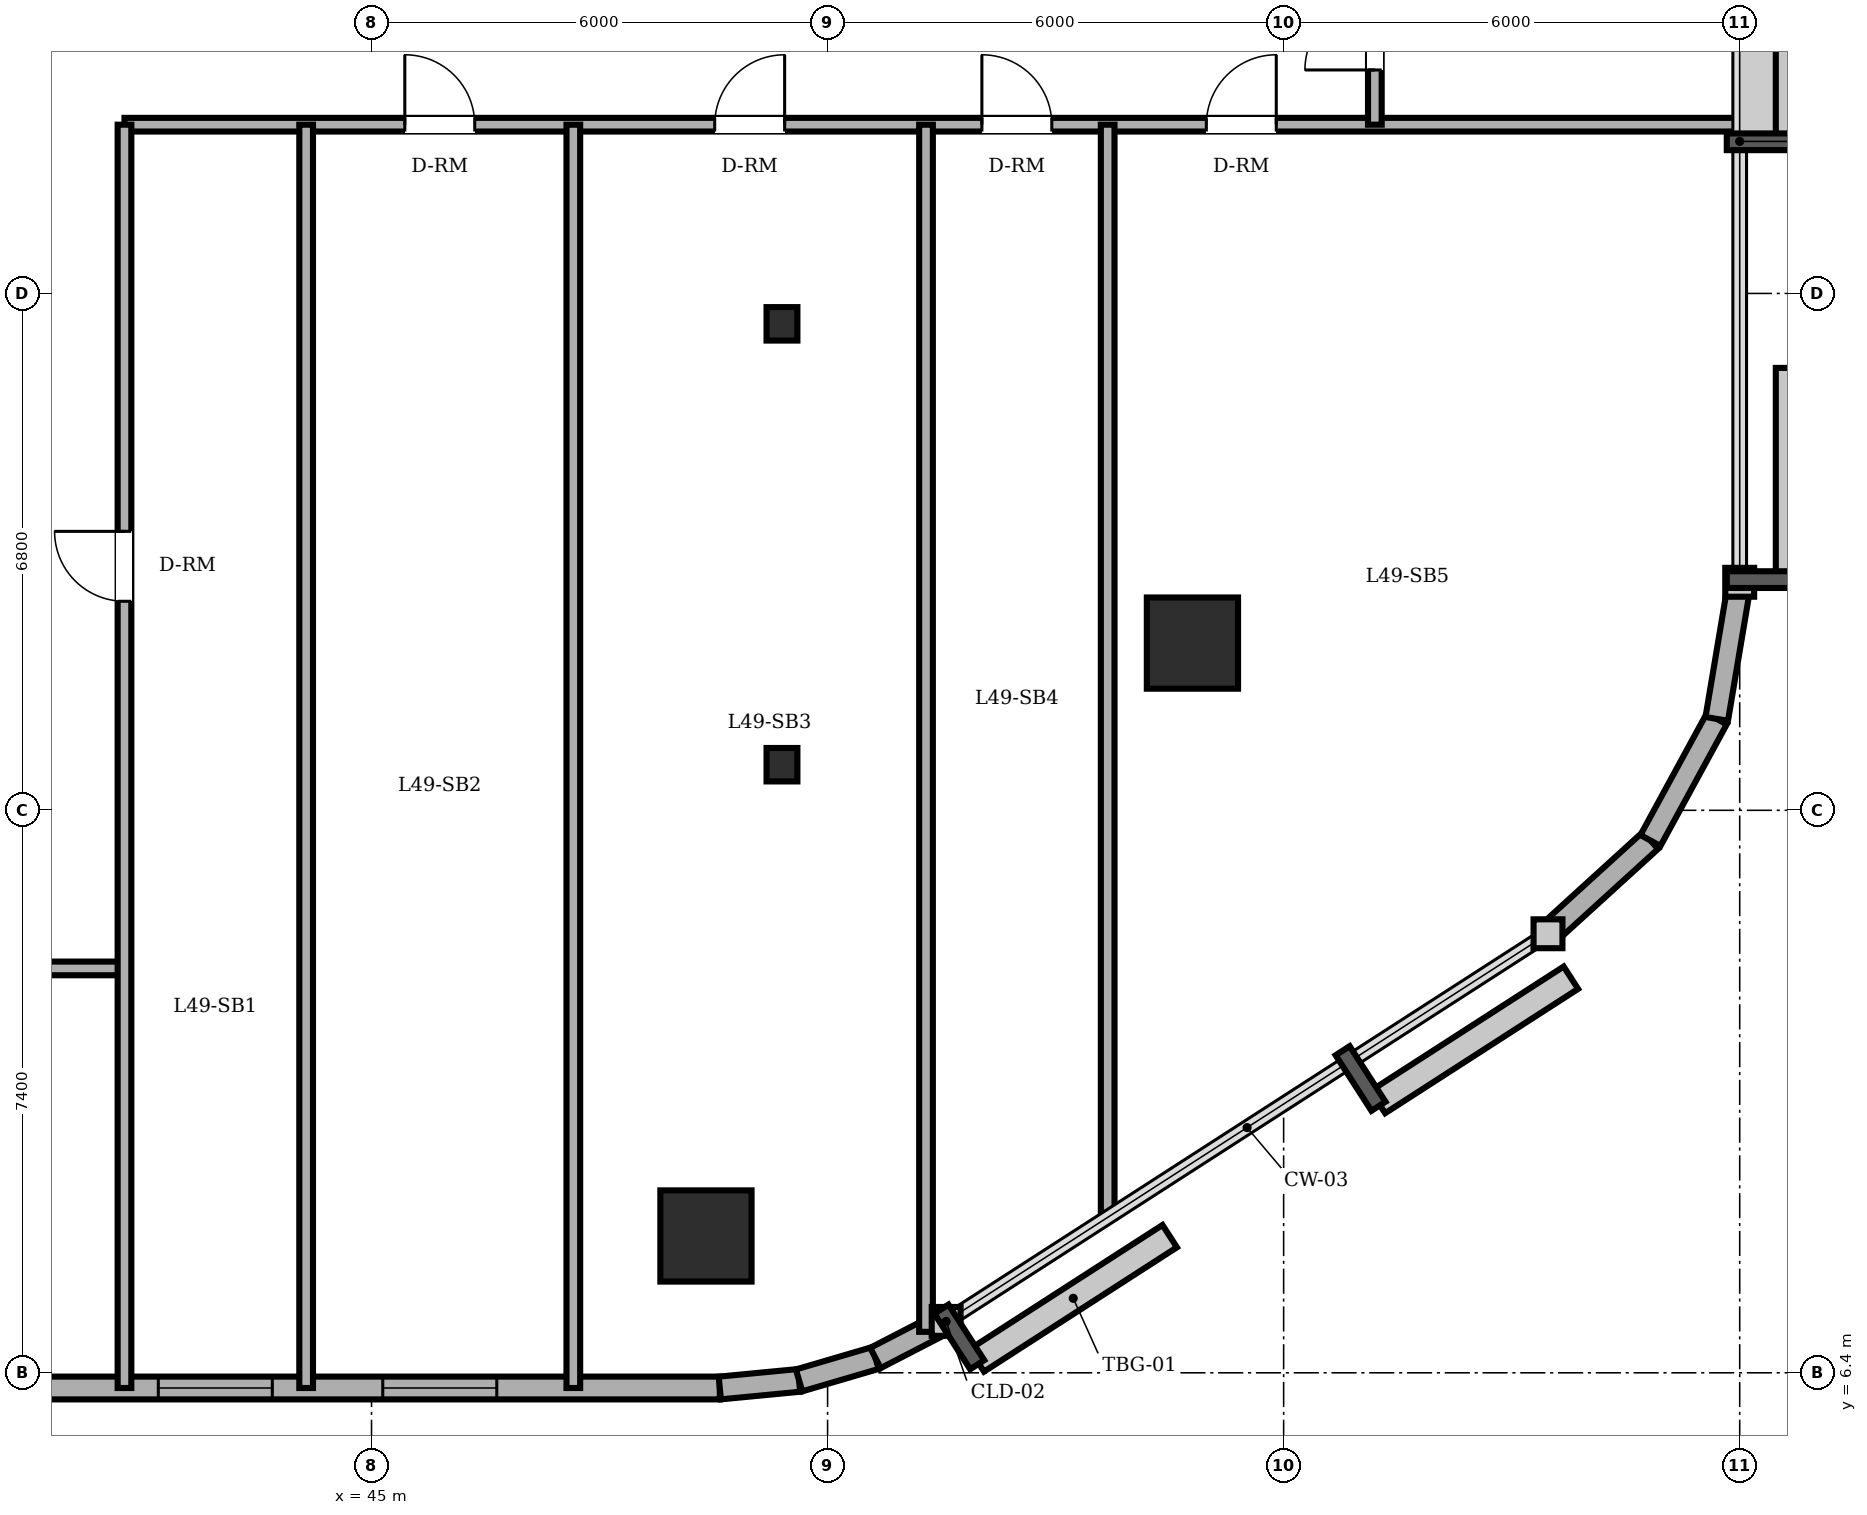
"""IFC4 building model, lengths in metres.
Left out: names, types, materials, properties, quantities, classifications, styles, units other than length and angle.
Written with IfcOpenShell. Run it as: python <this file> out.ifc"""

import sys

from ifc_helpers import new_model, si_unit, direction, frame, frame_2d, origin, origin_2d, place, context, subcontext, project, spatial, rectangle, circle, i_section, extrude, element, fill, save


model = new_model("IFC4")
c1 = context("Model", 3, precision=1e-05, world=origin(), true_north=direction((0.0, 1.0)))
c2 = subcontext(c1, "Body", "Model", "MODEL_VIEW")
j1 = project(units=[si_unit("LENGTHUNIT", "METRE"), si_unit("PLANEANGLEUNIT", "RADIAN")], contexts=[c1])
p1 = place(None, origin())
s1 = spatial("IfcSite", under=j1, at=p1, CompositionType="ELEMENT")
p2 = place(p1, origin())
s2 = spatial("IfcBuilding", under=s1, at=p2, CompositionType="ELEMENT")
p3 = place(p2, frame((0.0, 0.0, 187.0)))
s3 = spatial("IfcBuildingStorey", under=s2, at=p3, CompositionType="ELEMENT", Elevation=187.0)
for number, where, z_axis, x_axis in (
    (1, (49.4, 8.2, 0.0), (0.0, 0.0, 1.0), (1.0, 0.0, 0.0)),
    (2, (55.8, 16.0, 0.0), (0.0, 0.0, 1.0), (1.0, 0.0, 0.0)),
):
    element("IfcColumn", number, at=place(p3, frame(where, z_axis=z_axis, x_axis=x_axis)), inside=s3, PredefinedType="COLUMN", context=c2, shape_type="SweptSolid", body=[
        extrude(circle(Radius=0.6, at=origin_2d()), origin(), (0.0, 0.0, 1.0), 3.6),
    ])
for number, where, z_axis, x_axis in (
    (3, (50.4, 14.4, 0.0), (0.0, 0.0, 1.0), (1.0, 0.0, 0.0)),
    (4, (50.4, 20.2, 0.0), (0.0, 0.0, 1.0), (1.0, 0.0, 0.0)),
):
    element("IfcColumn", number, at=place(p3, frame(where, z_axis=z_axis, x_axis=x_axis)), inside=s3, PredefinedType="COLUMN", context=c2, shape_type="SweptSolid", body=[
        extrude(i_section(OverallWidth=0.406, OverallDepth=0.44, WebThickness=0.024, FlangeThickness=0.039, FilletRadius=0.015, at=origin_2d()), origin(), (0.0, 0.0, 1.0), 3.6),
    ])
p4 = place(p3, frame((19.3, 6.2, 0.0), z_axis=(0.0, 0.0, 1.0), x_axis=(1.0, 0.0, 0.0)))
e5 = element("IfcWall", 5, at=p4, inside=s3, PredefinedType="SOLIDWALL", context=c2, shape_type="SweptSolid", body=[
    extrude(rectangle(XDim=30.282, YDim=0.3, at=frame_2d((15.141, 0.0))), origin(), (0.0, 0.0, 1.0), 3.36),
])
p5 = place(p4, frame((14.225, 0.0, 0.0)))
e6 = element("IfcOpeningElement", 6, at=p5, cuts=e5, PredefinedType="OPENING", context=c2, shape_type="SweptSolid", body=[
    extrude(rectangle(XDim=0.95, YDim=2.2, at=frame_2d((0.475, 1.1))), frame((0.0, 0.16, 0.0), z_axis=(0.0, -1.0, 0.0), x_axis=(1.0, 0.0, 0.0)), (0.0, 0.0, 1.0), 0.32),
])
p6 = place(p4, frame((1.25, 0.0, 0.85)))
e7 = element("IfcOpeningElement", 7, at=p6, cuts=e5, PredefinedType="OPENING", context=c2, shape_type="SweptSolid", body=[
    extrude(rectangle(XDim=1.5, YDim=1.55, at=frame_2d((0.75, 0.775))), frame((0.0, 0.16, 0.0), z_axis=(0.0, -1.0, 0.0), x_axis=(1.0, 0.0, 0.0)), (0.0, 0.0, 1.0), 0.32),
])
p7 = place(p4, frame((2.9, 0.0, 0.85)))
e8 = element("IfcOpeningElement", 8, at=p7, cuts=e5, PredefinedType="OPENING", context=c2, shape_type="SweptSolid", body=[
    extrude(rectangle(XDim=1.5, YDim=1.55, at=frame_2d((0.75, 0.775))), frame((0.0, 0.16, 0.0), z_axis=(0.0, -1.0, 0.0), x_axis=(1.0, 0.0, 0.0)), (0.0, 0.0, 1.0), 0.32),
])
p8 = place(p4, frame((6.45, 0.0, 0.85)))
e9 = element("IfcOpeningElement", 9, at=p8, cuts=e5, PredefinedType="OPENING", context=c2, shape_type="SweptSolid", body=[
    extrude(rectangle(XDim=1.5, YDim=1.55, at=frame_2d((0.75, 0.775))), frame((0.0, 0.16, 0.0), z_axis=(0.0, -1.0, 0.0), x_axis=(1.0, 0.0, 0.0)), (0.0, 0.0, 1.0), 0.32),
])
p9 = place(p4, frame((17.25, 0.0, 0.85)))
e10 = element("IfcOpeningElement", 10, at=p9, cuts=e5, PredefinedType="OPENING", context=c2, shape_type="SweptSolid", body=[
    extrude(rectangle(XDim=1.5, YDim=1.55, at=frame_2d((0.75, 0.775))), frame((0.0, 0.16, 0.0), z_axis=(0.0, -1.0, 0.0), x_axis=(1.0, 0.0, 0.0)), (0.0, 0.0, 1.0), 0.32),
])
p10 = place(p4, frame((22.895, 0.0, 0.85)))
e11 = element("IfcOpeningElement", 11, at=p10, cuts=e5, PredefinedType="OPENING", context=c2, shape_type="SweptSolid", body=[
    extrude(rectangle(XDim=1.5, YDim=1.55, at=frame_2d((0.75, 0.775))), frame((0.0, 0.16, 0.0), z_axis=(0.0, -1.0, 0.0), x_axis=(1.0, 0.0, 0.0)), (0.0, 0.0, 1.0), 0.32),
])
p11 = place(p4, frame((25.848, 0.0, 0.85)))
e12 = element("IfcOpeningElement", 12, at=p11, cuts=e5, PredefinedType="OPENING", context=c2, shape_type="SweptSolid", body=[
    extrude(rectangle(XDim=1.5, YDim=1.55, at=frame_2d((0.75, 0.775))), frame((0.0, 0.16, 0.0), z_axis=(0.0, -1.0, 0.0), x_axis=(1.0, 0.0, 0.0)), (0.0, 0.0, 1.0), 0.32),
])
p12 = place(p3, frame((49.582, 6.2, 0.0), z_axis=(0.0, 0.0, 1.0), x_axis=(0.995426089968, 0.095534807324, 0.0)))
e13 = element("IfcWall", 13, at=p12, inside=s3, PredefinedType="SOLIDWALL", context=c2, shape_type="SweptSolid", body=[
    extrude(rectangle(XDim=1.048, YDim=0.3, at=frame_2d((0.524, 0.0))), origin(), (0.0, 0.0, 1.0), 3.36),
])
p13 = place(p3, frame((50.625, 6.3, 0.0), z_axis=(0.0, 0.0, 1.0), x_axis=(0.959528674476, 0.281610942363, 0.0)))
e14 = element("IfcWall", 14, at=p13, inside=s3, PredefinedType="SOLIDWALL", context=c2, shape_type="SweptSolid", body=[
    extrude(rectangle(XDim=1.047, YDim=0.3, at=frame_2d((0.524, 0.0))), origin(), (0.0, 0.0, 1.0), 3.36),
])
p14 = place(p3, frame((51.63, 6.595, 0.0), z_axis=(0.0, 0.0, 1.0), x_axis=(0.888283247196, 0.459296062198, 0.0)))
e15 = element("IfcWall", 15, at=p14, inside=s3, PredefinedType="SOLIDWALL", context=c2, shape_type="SweptSolid", body=[
    extrude(rectangle(XDim=1.047, YDim=0.3, at=frame_2d((0.523, 0.0))), origin(), (0.0, 0.0, 1.0), 3.36),
])
p15 = place(p3, frame((60.478, 12.176, 0.0), z_axis=(0.0, 0.0, 1.0), x_axis=(0.73947929393, 0.673179302897, 0.0)))
e16 = element("IfcWall", 16, at=p15, inside=s3, PredefinedType="SOLIDWALL", context=c2, shape_type="SweptSolid", body=[
    extrude(rectangle(XDim=1.823, YDim=0.3, at=frame_2d((0.911, 0.0))), origin(), (0.0, 0.0, 1.0), 3.36),
])
p16 = place(p3, frame((61.826, 13.403, 0.0), z_axis=(0.0, 0.0, 1.0), x_axis=(0.478608030646, 0.878028674362, 0.0)))
e17 = element("IfcWall", 17, at=p16, inside=s3, PredefinedType="SOLIDWALL", context=c2, shape_type="SweptSolid", body=[
    extrude(rectangle(XDim=1.822, YDim=0.3, at=frame_2d((0.911, 0.0))), origin(), (0.0, 0.0, 1.0), 3.36),
])
p17 = place(p3, frame((62.698, 15.003, 0.0), z_axis=(0.0, 0.0, 1.0), x_axis=(0.165724081207, 0.986172159873, 0.0)))
e18 = element("IfcWall", 18, at=p17, inside=s3, PredefinedType="SOLIDWALL", context=c2, shape_type="SweptSolid", body=[
    extrude(rectangle(XDim=1.822, YDim=0.3, at=frame_2d((0.911, 0.0))), origin(), (0.0, 0.0, 1.0), 3.36),
])
p18 = place(p3, frame((13.8, 11.72, 0.0), z_axis=(0.0, 0.0, 1.0), x_axis=(1.0, 0.0, 0.0)))
e19 = element("IfcWall", 19, at=p18, inside=s3, PredefinedType="PARTITIONING", context=c2, shape_type="SweptSolid", body=[
    extrude(rectangle(XDim=27.95, YDim=0.18, at=frame_2d((13.975, 0.0))), origin(), (0.0, 0.0, 1.0), 3.36),
])
p19 = place(p18, frame((12.24, 0.0, 0.0)))
e20 = element("IfcOpeningElement", 20, at=p19, cuts=e19, PredefinedType="OPENING", context=c2, shape_type="SweptSolid", body=[
    extrude(rectangle(XDim=0.92, YDim=2.1, at=frame_2d((0.46, 1.05))), frame((0.0, 0.1, 0.0), z_axis=(0.0, -1.0, 0.0), x_axis=(1.0, 0.0, 0.0)), (0.0, 0.0, 1.0), 0.2),
])
p20 = place(p18, frame((5.54, 0.0, 0.0)))
e21 = element("IfcOpeningElement", 21, at=p20, cuts=e19, PredefinedType="OPENING", context=c2, shape_type="SweptSolid", body=[
    extrude(rectangle(XDim=0.92, YDim=2.1, at=frame_2d((0.46, 1.05))), frame((0.0, 0.1, 0.0), z_axis=(0.0, -1.0, 0.0), x_axis=(1.0, 0.0, 0.0)), (0.0, 0.0, 1.0), 0.2),
])
p21 = place(p18, frame((20.555, 0.0, 0.0)))
e22 = element("IfcOpeningElement", 22, at=p21, cuts=e19, PredefinedType="OPENING", context=c2, shape_type="SweptSolid", body=[
    extrude(rectangle(XDim=0.92, YDim=2.1, at=frame_2d((0.46, 1.05))), frame((0.0, 0.1, 0.0), z_axis=(0.0, -1.0, 0.0), x_axis=(1.0, 0.0, 0.0)), (0.0, 0.0, 1.0), 0.2),
])
p22 = place(p3, frame((41.75, 22.82, 0.0), z_axis=(0.0, 0.0, 1.0), x_axis=(1.0, 0.0, 0.0)))
e23 = element("IfcWall", 23, at=p22, inside=s3, PredefinedType="PARTITIONING", context=c2, shape_type="SweptSolid", body=[
    extrude(rectangle(XDim=21.25, YDim=0.18, at=frame_2d((10.625, 0.0))), origin(), (0.0, 0.0, 1.0), 3.36),
])
p23 = place(p22, frame((3.688, 0.0, 0.0)))
e24 = element("IfcOpeningElement", 24, at=p23, cuts=e23, PredefinedType="OPENING", context=c2, shape_type="SweptSolid", body=[
    extrude(rectangle(XDim=0.92, YDim=2.1, at=frame_2d((0.46, 1.05))), frame((0.0, 0.1, 0.0), z_axis=(0.0, -1.0, 0.0), x_axis=(1.0, 0.0, 0.0)), (0.0, 0.0, 1.0), 0.2),
])
p24 = place(p22, frame((7.765, 0.0, 0.0)))
e25 = element("IfcOpeningElement", 25, at=p24, cuts=e23, PredefinedType="OPENING", context=c2, shape_type="SweptSolid", body=[
    extrude(rectangle(XDim=0.92, YDim=2.1, at=frame_2d((0.46, 1.05))), frame((0.0, 0.1, 0.0), z_axis=(0.0, -1.0, 0.0), x_axis=(1.0, 0.0, 0.0)), (0.0, 0.0, 1.0), 0.2),
])
p25 = place(p22, frame((11.28, 0.0, 0.0)))
e26 = element("IfcOpeningElement", 26, at=p25, cuts=e23, PredefinedType="OPENING", context=c2, shape_type="SweptSolid", body=[
    extrude(rectangle(XDim=0.92, YDim=2.1, at=frame_2d((0.46, 1.05))), frame((0.0, 0.1, 0.0), z_axis=(0.0, -1.0, 0.0), x_axis=(1.0, 0.0, 0.0)), (0.0, 0.0, 1.0), 0.2),
])
p26 = place(p22, frame((14.233, 0.0, 0.0)))
e27 = element("IfcOpeningElement", 27, at=p26, cuts=e23, PredefinedType="OPENING", context=c2, shape_type="SweptSolid", body=[
    extrude(rectangle(XDim=0.92, YDim=2.1, at=frame_2d((0.46, 1.05))), frame((0.0, 0.1, 0.0), z_axis=(0.0, -1.0, 0.0), x_axis=(1.0, 0.0, 0.0)), (0.0, 0.0, 1.0), 0.2),
])
p27 = place(p3, frame((41.75, 6.2, 0.0), z_axis=(0.0, 0.0, 1.0), x_axis=(0.0, 1.0, 0.0)))
e28 = element("IfcWall", 28, at=p27, inside=s3, PredefinedType="PARTITIONING", context=c2, shape_type="SweptSolid", body=[
    extrude(rectangle(XDim=16.62, YDim=0.18, at=frame_2d((8.31, 0.0))), origin(), (0.0, 0.0, 1.0), 3.36),
])
p28 = place(p27, frame((10.35, 0.0, 0.0)))
e29 = element("IfcOpeningElement", 29, at=p28, cuts=e28, PredefinedType="OPENING", context=c2, shape_type="SweptSolid", body=[
    extrude(rectangle(XDim=0.92, YDim=2.1, at=frame_2d((0.46, 1.05))), frame((0.0, 0.1, 0.0), z_axis=(0.0, -1.0, 0.0), x_axis=(1.0, 0.0, 0.0)), (0.0, 0.0, 1.0), 0.2),
])
for number, where, z_axis, x_axis in (
    (30, (44.14, 6.2, 0.0), (0.0, 0.0, 1.0), (0.0, 1.0, 0.0)),
    (31, (47.655, 6.2, 0.0), (0.0, 0.0, 1.0), (0.0, 1.0, 0.0)),
):
    element("IfcWall", number, at=place(p3, frame(where, z_axis=z_axis, x_axis=x_axis)), inside=s3, PredefinedType="PARTITIONING", context=c2, shape_type="SweptSolid", body=[
        extrude(rectangle(XDim=16.62, YDim=0.18, at=frame_2d((8.31, 0.0))), origin(), (0.0, 0.0, 1.0), 3.36),
    ])
p29 = place(p3, frame((52.295, 6.939, 0.0), z_axis=(0.0, 0.0, 1.0), x_axis=(0.0, 1.0, 0.0)))
e32 = element("IfcWall", 32, at=p29, inside=s3, PredefinedType="PARTITIONING", context=c2, shape_type="SweptSolid", body=[
    extrude(rectangle(XDim=15.881, YDim=0.18, at=frame_2d((7.94, 0.0))), origin(), (0.0, 0.0, 1.0), 3.36),
])
p30 = place(p3, frame((54.685, 8.445, 0.0), z_axis=(0.0, 0.0, 1.0), x_axis=(0.0, 1.0, 0.0)))
e33 = element("IfcWall", 33, at=p30, inside=s3, PredefinedType="PARTITIONING", context=c2, shape_type="SweptSolid", body=[
    extrude(rectangle(XDim=14.375, YDim=0.18, at=frame_2d((7.188, 0.0))), origin(), (0.0, 0.0, 1.0), 3.36),
])
p31 = place(p3, frame((58.2, 22.82, 0.0), z_axis=(0.0, 0.0, 1.0), x_axis=(0.0, 1.0, 0.0)))
e34 = element("IfcWall", 34, at=p31, inside=s3, PredefinedType="PARTITIONING", context=c2, shape_type="SweptSolid", body=[
    extrude(rectangle(XDim=2.36, YDim=0.18, at=frame_2d((1.18, 0.0))), origin(), (0.0, 0.0, 1.0), 3.36),
])
p32 = place(p31, frame((0.72, 0.0, 0.0)))
e35 = element("IfcOpeningElement", 35, at=p32, cuts=e34, PredefinedType="OPENING", context=c2, shape_type="SweptSolid", body=[
    extrude(rectangle(XDim=0.92, YDim=2.1, at=frame_2d((0.46, 1.05))), frame((0.0, 0.1, 0.0), z_axis=(0.0, -1.0, 0.0), x_axis=(1.0, 0.0, 0.0)), (0.0, 0.0, 1.0), 0.2),
])
p33 = place(p10, origin())
e36 = element("IfcWindow", 36, at=p33, inside=s3, PartitioningType="DOUBLE_PANEL_VERTICAL", PredefinedType="WINDOW", context=c2, shape_type="SweptSolid", body=[
    extrude(rectangle(XDim=1.5, YDim=1.55, at=frame_2d((0.75, 0.775))), frame((0.0, 0.03, 0.0), z_axis=(0.0, -1.0, 0.0), x_axis=(1.0, 0.0, 0.0)), (0.0, 0.0, 1.0), 0.06),
])
fill(e11, e36)
p34 = place(p11, origin())
e37 = element("IfcWindow", 37, at=p34, inside=s3, PartitioningType="DOUBLE_PANEL_VERTICAL", PredefinedType="WINDOW", context=c2, shape_type="SweptSolid", body=[
    extrude(rectangle(XDim=1.5, YDim=1.55, at=frame_2d((0.75, 0.775))), frame((0.0, 0.03, 0.0), z_axis=(0.0, -1.0, 0.0), x_axis=(1.0, 0.0, 0.0)), (0.0, 0.0, 1.0), 0.06),
])
fill(e12, e37)
p35 = place(p28, origin())
e38 = element("IfcDoor", 38, at=p35, inside=s3, OperationType="SINGLE_SWING_RIGHT", PredefinedType="DOOR", context=c2, shape_type="SweptSolid", body=[
    extrude(rectangle(XDim=0.92, YDim=2.1, at=frame_2d((0.46, 1.05))), frame((0.0, 0.025, 0.0), z_axis=(0.0, -1.0, 0.0), x_axis=(1.0, 0.0, 0.0)), (0.0, 0.0, 1.0), 0.05),
])
fill(e29, e38)
p36 = place(p23, origin())
e39 = element("IfcDoor", 39, at=p36, inside=s3, OperationType="SINGLE_SWING_LEFT", PredefinedType="DOOR", context=c2, shape_type="SweptSolid", body=[
    extrude(rectangle(XDim=0.92, YDim=2.1, at=frame_2d((0.46, 1.05))), frame((0.0, 0.025, 0.0), z_axis=(0.0, -1.0, 0.0), x_axis=(1.0, 0.0, 0.0)), (0.0, 0.0, 1.0), 0.05),
])
fill(e24, e39)
p37 = place(p24, origin())
e40 = element("IfcDoor", 40, at=p37, inside=s3, OperationType="SINGLE_SWING_RIGHT", PredefinedType="DOOR", context=c2, shape_type="SweptSolid", body=[
    extrude(rectangle(XDim=0.92, YDim=2.1, at=frame_2d((0.46, 1.05))), frame((0.0, 0.025, 0.0), z_axis=(0.0, -1.0, 0.0), x_axis=(1.0, 0.0, 0.0)), (0.0, 0.0, 1.0), 0.05),
])
fill(e25, e40)
p38 = place(p25, origin())
e41 = element("IfcDoor", 41, at=p38, inside=s3, OperationType="SINGLE_SWING_LEFT", PredefinedType="DOOR", context=c2, shape_type="SweptSolid", body=[
    extrude(rectangle(XDim=0.92, YDim=2.1, at=frame_2d((0.46, 1.05))), frame((0.0, 0.025, 0.0), z_axis=(0.0, -1.0, 0.0), x_axis=(1.0, 0.0, 0.0)), (0.0, 0.0, 1.0), 0.05),
])
fill(e26, e41)
p39 = place(p26, origin())
e42 = element("IfcDoor", 42, at=p39, inside=s3, OperationType="SINGLE_SWING_RIGHT", PredefinedType="DOOR", context=c2, shape_type="SweptSolid", body=[
    extrude(rectangle(XDim=0.92, YDim=2.1, at=frame_2d((0.46, 1.05))), frame((0.0, 0.025, 0.0), z_axis=(0.0, -1.0, 0.0), x_axis=(1.0, 0.0, 0.0)), (0.0, 0.0, 1.0), 0.05),
])
fill(e27, e42)
p40 = place(p32, origin())
e43 = element("IfcDoor", 43, at=p40, inside=s3, OperationType="SINGLE_SWING_LEFT", PredefinedType="DOOR", context=c2, shape_type="SweptSolid", body=[
    extrude(rectangle(XDim=0.92, YDim=2.1, at=frame_2d((0.46, 1.05))), frame((0.0, 0.025, 0.0), z_axis=(0.0, -1.0, 0.0), x_axis=(1.0, 0.0, 0.0)), (0.0, 0.0, 1.0), 0.05),
])
fill(e35, e43)
save(model, sys.argv[1])
